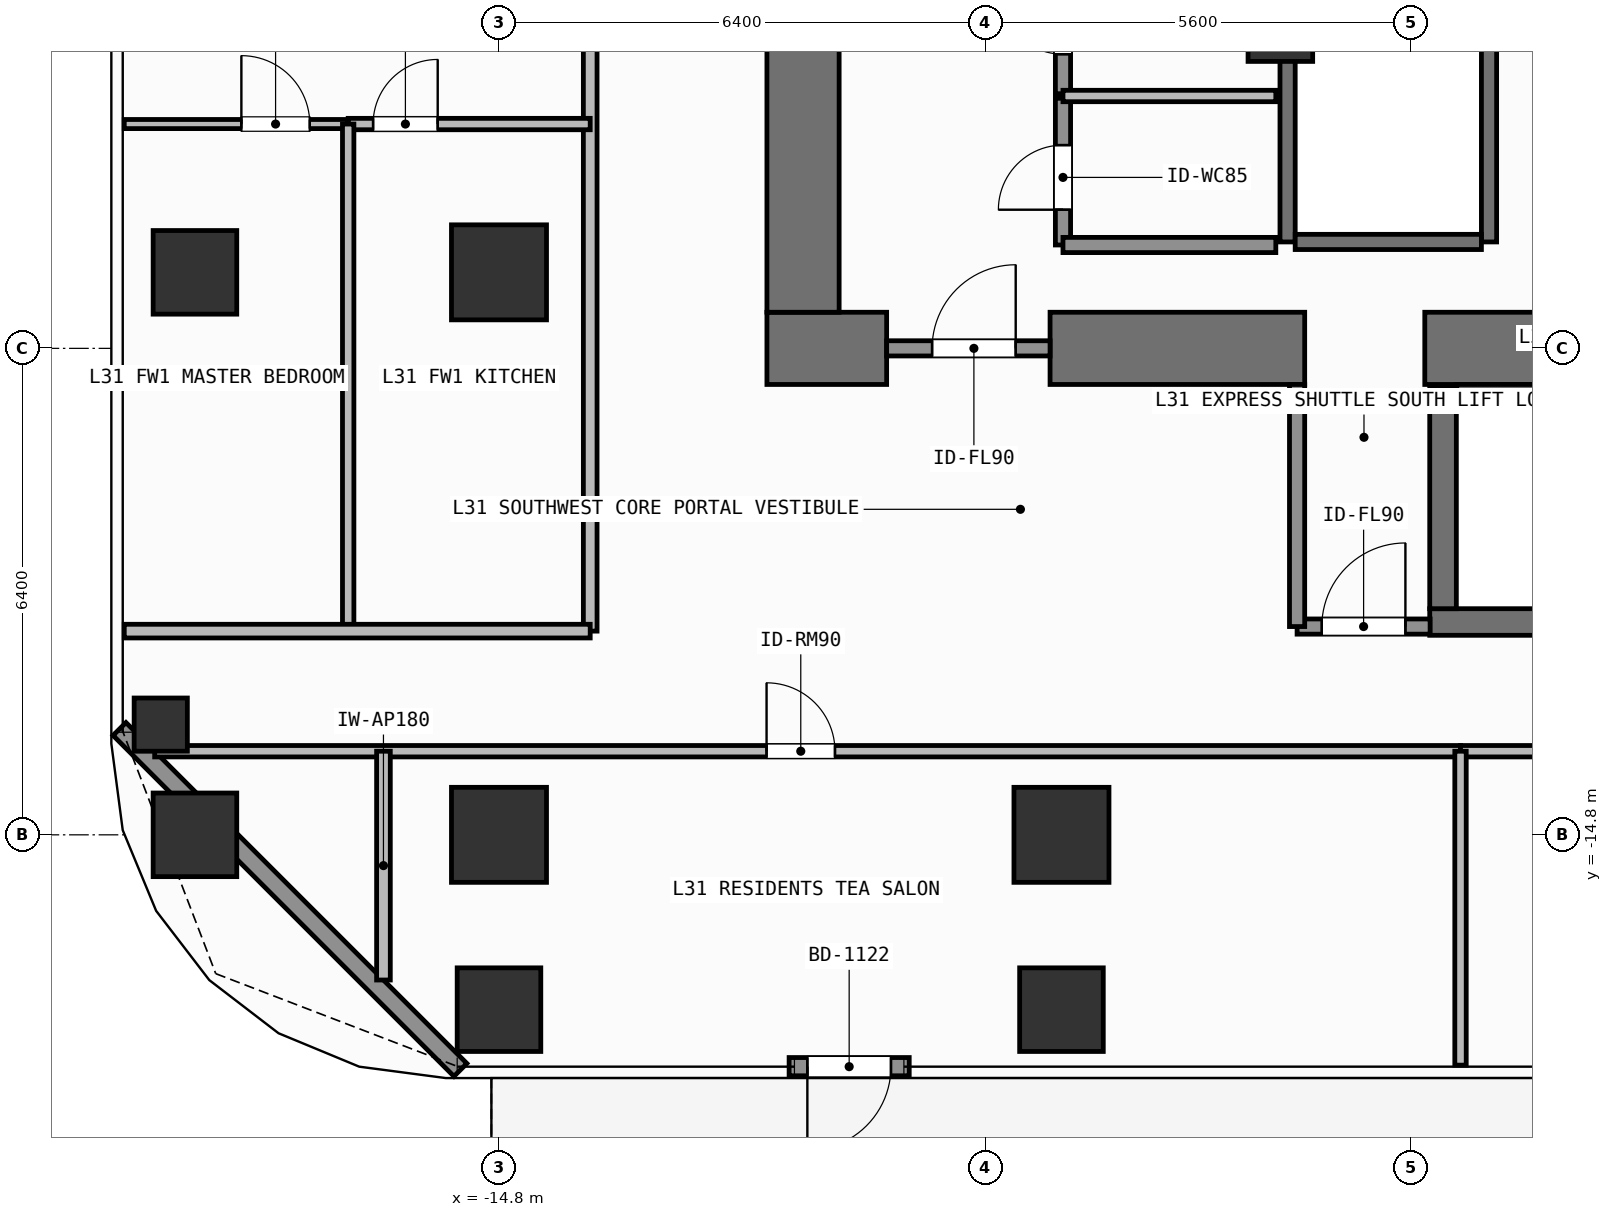
"""IFC4 building model, lengths in metres.
Left out: names, types, materials, properties, quantities, classifications, styles, units other than length and angle.
Written with IfcOpenShell. Run it as: python <this file> out.ifc"""

import sys

from ifc_helpers import new_model, si_unit, direction, frame, frame_2d, origin, origin_2d, place, context, subcontext, project, spatial, rectangle, hollow_rectangle, extrude, element, fill, save


model = new_model("IFC4")
c1 = context("Model", 3, precision=1e-05, world=origin(), true_north=direction((0.0, 1.0)))
c2 = subcontext(c1, "Body", "Model", "MODEL_VIEW")
j1 = project(units=[si_unit("LENGTHUNIT", "METRE"), si_unit("PLANEANGLEUNIT", "RADIAN")], contexts=[c1])
p1 = place(None, origin())
s1 = spatial("IfcSite", under=j1, at=p1, CompositionType="ELEMENT")
p2 = place(p1, origin())
s2 = spatial("IfcBuilding", under=s1, at=p2, CompositionType="ELEMENT")
p3 = place(p2, frame((0.0, 0.0, 125.1)))
s3 = spatial("IfcBuildingStorey", under=s2, at=p3, CompositionType="ELEMENT", Elevation=125.1)
p4 = place(p3, frame((-11.275, -8.4, 0.0), z_axis=(0.0, 0.0, 1.0), x_axis=(1.0, 0.0, 0.0)))
e1 = element("IfcWall", 1, at=p4, inside=s3, PredefinedType="SHEAR", context=c2, shape_type="SweptSolid", body=[
    extrude(rectangle(XDim=1.575, YDim=0.95, at=frame_2d((0.788, 0.0))), origin(), (0.0, 0.0, 1.0), 3.9),
])
p5 = place(p3, frame((-7.55, -8.4, 0.0), z_axis=(0.0, 0.0, 1.0), x_axis=(1.0, 0.0, 0.0)))
e2 = element("IfcWall", 2, at=p5, inside=s3, PredefinedType="SHEAR", context=c2, shape_type="SweptSolid", body=[
    extrude(rectangle(XDim=3.35, YDim=0.95, at=frame_2d((1.675, 0.0))), origin(), (0.0, 0.0, 1.0), 3.9),
])
p6 = place(p3, frame((-2.62, -8.4, 0.0), z_axis=(0.0, 0.0, 1.0), x_axis=(1.0, 0.0, 0.0)))
e3 = element("IfcWall", 3, at=p6, inside=s3, PredefinedType="SHEAR", context=c2, shape_type="SweptSolid", body=[
    extrude(rectangle(XDim=7.27, YDim=0.95, at=frame_2d((3.635, 0.0))), origin(), (0.0, 0.0, 1.0), 3.9),
])
p7 = place(p3, frame((-10.8, -7.925, 0.0), z_axis=(0.0, 0.0, 1.0), x_axis=(0.0, 1.0, 0.0)))
e4 = element("IfcWall", 4, at=p7, inside=s3, PredefinedType="SHEAR", context=c2, shape_type="SweptSolid", body=[
    extrude(rectangle(XDim=15.85, YDim=0.95, at=frame_2d((7.925, 0.0))), origin(), (0.0, 0.0, 1.0), 3.9),
])
p8 = place(p3, frame((-2.555, -12.0, 0.0), z_axis=(0.0, 0.0, 1.0), x_axis=(1.0, 0.0, 0.0)))
e5 = element("IfcWall", 5, at=p8, inside=s3, PredefinedType="SHEAR", context=c2, shape_type="SweptSolid", body=[
    extrude(rectangle(XDim=7.31, YDim=0.35, at=frame_2d((3.655, 0.0))), origin(), (0.0, 0.0, 1.0), 3.9),
])
p9 = place(p3, frame((-2.2, -8.95, 0.0), z_axis=(0.0, 0.0, 1.0), x_axis=(1.0, 0.0, 0.0)))
e6 = element("IfcWall", 6, at=p9, inside=s3, PredefinedType="SHEAR", context=c2, shape_type="SweptSolid", body=[
    extrude(rectangle(XDim=6.6, YDim=0.15, at=frame_2d((3.3, 0.0))), origin(), (0.0, 0.0, 1.0), 3.9),
])
p10 = place(p3, frame((-2.38, -11.825, 0.0), z_axis=(0.0, 0.0, 1.0), x_axis=(0.0, 1.0, 0.0)))
e7 = element("IfcWall", 7, at=p10, inside=s3, PredefinedType="SHEAR", context=c2, shape_type="SweptSolid", body=[
    extrude(rectangle(XDim=2.925, YDim=0.35, at=frame_2d((1.462, 0.0))), origin(), (0.0, 0.0, 1.0), 3.9),
])
for number, where, z_axis, x_axis in (
    (8, (-14.8, -14.8, 0.0), (0.0, 0.0, 1.0), (1.0, 0.0, 0.0)),
    (9, (-7.4, -14.8, 0.0), (0.0, 0.0, 1.0), (1.0, 0.0, 0.0)),
    (10, (-14.8, -7.4, 0.0), (0.0, 0.0, 1.0), (1.0, 0.0, 0.0)),
):
    element("IfcColumn", number, at=place(p3, frame(where, z_axis=z_axis, x_axis=x_axis)), inside=s3, PredefinedType="COLUMN", context=c2, shape_type="SweptSolid", body=[
        extrude(rectangle(XDim=1.25, YDim=1.25, at=origin_2d()), origin(), (0.0, 0.0, 1.0), 3.9),
    ])
p11 = place(p3, frame((-4.52, -4.2, 0.0), z_axis=(0.0, 0.0, 1.0), x_axis=(1.0, 0.0, 0.0)))
e11 = element("IfcColumn", 11, at=p11, inside=s3, PredefinedType="COLUMN", context=c2, shape_type="SweptSolid", body=[
    extrude(rectangle(XDim=0.85, YDim=0.85, at=origin_2d()), origin(), (0.0, 0.0, 1.0), 3.9),
])
for number, where, z_axis, x_axis in (
    (12, (-18.8, -14.8, 0.0), (0.0, 0.0, 1.0), (1.0, 0.0, 0.0)),
    (13, (-18.8, -7.4, 0.0), (0.0, 0.0, 1.0), (1.0, 0.0, 0.0)),
    (14, (-14.8, -17.1, 0.0), (0.0, 0.0, 1.0), (1.0, 0.0, 0.0)),
    (15, (-7.4, -17.1, 0.0), (0.0, 0.0, 1.0), (1.0, 0.0, 0.0)),
):
    element("IfcColumn", number, at=place(p3, frame(where, z_axis=z_axis, x_axis=x_axis)), inside=s3, PredefinedType="COLUMN", context=c2, shape_type="SweptSolid", body=[
        extrude(rectangle(XDim=1.1, YDim=1.1, at=origin_2d()), origin(), (0.0, 0.0, 1.0), 3.9),
    ])
p12 = place(p3, frame((-19.25, -13.35, 0.0), z_axis=(0.0, 0.0, 1.0), x_axis=(1.0, 0.0, 0.0)))
e16 = element("IfcColumn", 16, at=p12, inside=s3, PredefinedType="COLUMN", context=c2, shape_type="SweptSolid", body=[
    extrude(hollow_rectangle(XDim=0.7, YDim=0.7, WallThickness=0.032, at=origin_2d()), origin(), (0.0, 0.0, 1.0), 3.9),
])
p13 = place(p3, frame((-9.403, -17.85, 0.0), z_axis=(0.0, 0.0, 1.0), x_axis=(-1.0, 0.0, 0.0)))
e17 = element("IfcWall", 17, at=p13, inside=s3, PredefinedType="SOLIDWALL", context=c2, shape_type="SweptSolid", body=[
    extrude(rectangle(XDim=1.58, YDim=0.24, at=frame_2d((0.79, 0.0))), origin(), (0.0, 0.0, 1.0), 3.68),
])
p14 = place(p13, frame((0.24, 0.0, 0.0)))
e18 = element("IfcOpeningElement", 18, at=p14, cuts=e17, PredefinedType="OPENING", context=c2, shape_type="SweptSolid", body=[
    extrude(rectangle(XDim=1.1, YDim=2.2, at=frame_2d((0.55, 1.1))), frame((0.0, 0.13, 0.0), z_axis=(0.0, -1.0, 0.0), x_axis=(1.0, 0.0, 0.0)), (0.0, 0.0, 1.0), 0.26),
])
p15 = place(p3, frame((-15.308, -17.892, 0.0), z_axis=(0.0, 0.0, 1.0), x_axis=(-0.707126027686, 0.707087534163, 0.0)))
e19 = element("IfcWall", 19, at=p15, inside=s3, PredefinedType="SOLIDWALL", context=c2, shape_type="SweptSolid", body=[
    extrude(rectangle(XDim=6.342, YDim=0.24, at=frame_2d((3.171, 0.0))), origin(), (0.0, 0.0, 1.0), 3.68),
])
for number, where, z_axis, x_axis in (
    (20, (-4.425, -7.0, 0.0), (0.0, 0.0, 1.0), (0.0, 1.0, 0.0)),
    (21, (-1.775, -7.0, 0.0), (0.0, 0.0, 1.0), (0.0, 1.0, 0.0)),
):
    element("IfcWall", number, at=place(p3, frame(where, z_axis=z_axis, x_axis=x_axis)), inside=s3, PredefinedType="SHEAR", context=c2, shape_type="SweptSolid", body=[
        extrude(rectangle(XDim=2.8, YDim=0.2, at=frame_2d((1.4, 0.0))), origin(), (0.0, 0.0, 1.0), 3.68),
    ])
p16 = place(p3, frame((-4.325, -7.0, 0.0), z_axis=(0.0, 0.0, 1.0), x_axis=(1.0, 0.0, 0.0)))
e22 = element("IfcWall", 22, at=p16, inside=s3, PredefinedType="SHEAR", context=c2, shape_type="SweptSolid", body=[
    extrude(rectangle(XDim=2.45, YDim=0.2, at=frame_2d((1.225, 0.0))), origin(), (0.0, 0.0, 1.0), 3.68),
])
p17 = place(p3, frame((-9.7, -8.4, 0.0), z_axis=(0.0, 0.0, 1.0), x_axis=(1.0, 0.0, 0.0)))
e23 = element("IfcWall", 23, at=p17, inside=s3, PredefinedType="SOLIDWALL", context=c2, shape_type="SweptSolid", body=[
    extrude(rectangle(XDim=2.15, YDim=0.2, at=frame_2d((1.075, 0.0))), origin(), (0.0, 0.0, 1.0), 2.72),
])
p18 = place(p17, frame((0.598, 0.0, 0.0)))
e24 = element("IfcOpeningElement", 24, at=p18, cuts=e23, PredefinedType="OPENING", context=c2, shape_type="SweptSolid", body=[
    extrude(rectangle(XDim=1.1, YDim=2.15, at=frame_2d((0.55, 1.075))), frame((0.0, 0.11, 0.0), z_axis=(0.0, -1.0, 0.0), x_axis=(1.0, 0.0, 0.0)), (0.0, 0.0, 1.0), 0.22),
])
p19 = place(p3, frame((-4.3, -12.06, 0.0), z_axis=(0.0, 0.0, 1.0), x_axis=(1.0, 0.0, 0.0)))
e25 = element("IfcWall", 25, at=p19, inside=s3, PredefinedType="SOLIDWALL", context=c2, shape_type="SweptSolid", body=[
    extrude(rectangle(XDim=1.75, YDim=0.2, at=frame_2d((0.875, 0.0))), origin(), (0.0, 0.0, 1.0), 3.68),
])
p20 = place(p19, frame((0.325, 0.0, 0.0)))
e26 = element("IfcOpeningElement", 26, at=p20, cuts=e25, PredefinedType="OPENING", context=c2, shape_type="SweptSolid", body=[
    extrude(rectangle(XDim=1.1, YDim=2.15, at=frame_2d((0.55, 1.075))), frame((0.0, 0.11, 0.0), z_axis=(0.0, -1.0, 0.0), x_axis=(1.0, 0.0, 0.0)), (0.0, 0.0, 1.0), 0.22),
])
p21 = place(p3, frame((-7.38, -7.04, 0.0), z_axis=(0.0, 0.0, 1.0), x_axis=(0.0, 1.0, 0.0)))
e27 = element("IfcWall", 27, at=p21, inside=s3, PredefinedType="SOLIDWALL", context=c2, shape_type="SweptSolid", body=[
    extrude(rectangle(XDim=1.93, YDim=0.2, at=frame_2d((0.965, 0.0))), origin(), (0.0, 0.0, 1.0), 3.68),
])
p22 = place(p21, frame((0.464, 0.0, 0.0)))
e28 = element("IfcOpeningElement", 28, at=p22, cuts=e27, PredefinedType="OPENING", context=c2, shape_type="SweptSolid", body=[
    extrude(rectangle(XDim=0.85, YDim=2.1, at=frame_2d((0.425, 1.05))), frame((0.0, 0.11, 0.0), z_axis=(0.0, -1.0, 0.0), x_axis=(1.0, 0.0, 0.0)), (0.0, 0.0, 1.0), 0.22),
])
p23 = place(p3, frame((-7.38, -5.05, 0.0), z_axis=(0.0, 0.0, 1.0), x_axis=(0.0, 1.0, 0.0)))
e29 = element("IfcWall", 29, at=p23, inside=s3, PredefinedType="SOLIDWALL", context=c2, shape_type="SweptSolid", body=[
    extrude(rectangle(XDim=1.89, YDim=0.2, at=frame_2d((0.945, 0.0))), origin(), (0.0, 0.0, 1.0), 3.68),
])
p24 = place(p23, frame((0.52, 0.0, 0.0)))
e30 = element("IfcOpeningElement", 30, at=p24, cuts=e29, PredefinedType="OPENING", context=c2, shape_type="SweptSolid", body=[
    extrude(rectangle(XDim=0.85, YDim=2.1, at=frame_2d((0.425, 1.05))), frame((0.0, 0.11, 0.0), z_axis=(0.0, -1.0, 0.0), x_axis=(1.0, 0.0, 0.0)), (0.0, 0.0, 1.0), 0.22),
])
p25 = place(p3, frame((-19.33, -13.7, 0.0), z_axis=(0.0, 0.0, 1.0), x_axis=(1.0, 0.0, 0.0)))
e31 = element("IfcWall", 31, at=p25, inside=s3, PredefinedType="PARTITIONING", context=c2, shape_type="SweptSolid", body=[
    extrude(rectangle(XDim=17.18, YDim=0.15, at=frame_2d((8.59, 0.0))), origin(), (0.0, 0.0, 1.0), 3.68),
])
p26 = place(p25, frame((8.05, 0.0, 0.0)))
e32 = element("IfcOpeningElement", 32, at=p26, cuts=e31, PredefinedType="OPENING", context=c2, shape_type="SweptSolid", body=[
    extrude(rectangle(XDim=0.9, YDim=2.1, at=frame_2d((0.45, 1.05))), frame((0.0, 0.085, 0.0), z_axis=(0.0, -1.0, 0.0), x_axis=(1.0, 0.0, 0.0)), (0.0, 0.0, 1.0), 0.17),
])
p27 = place(p3, frame((-2.15, -13.7, 0.0), z_axis=(0.0, 0.0, 1.0), x_axis=(1.0, 0.0, 0.0)))
e33 = element("IfcWall", 33, at=p27, inside=s3, PredefinedType="PARTITIONING", context=c2, shape_type="SweptSolid", body=[
    extrude(rectangle(XDim=13.031, YDim=0.15, at=frame_2d((6.516, 0.0))), origin(), (0.0, 0.0, 1.0), 3.68),
])
p28 = place(p27, frame((6.065, 0.0, 0.0)))
e34 = element("IfcOpeningElement", 34, at=p28, cuts=e33, PredefinedType="OPENING", context=c2, shape_type="SweptSolid", body=[
    extrude(rectangle(XDim=0.9, YDim=2.1, at=frame_2d((0.45, 1.05))), frame((0.0, 0.085, 0.0), z_axis=(0.0, -1.0, 0.0), x_axis=(1.0, 0.0, 0.0)), (0.0, 0.0, 1.0), 0.17),
])
p29 = place(p3, frame((-13.6, -12.12, 0.0), z_axis=(0.0, 0.0, 1.0), x_axis=(0.0, 1.0, 0.0)))
e35 = element("IfcWall", 35, at=p29, inside=s3, PredefinedType="PARTITIONING", context=c2, shape_type="SweptSolid", body=[
    extrude(rectangle(XDim=24.24, YDim=0.18, at=frame_2d((12.12, 0.0))), origin(), (0.0, 0.0, 1.0), 3.68),
])
p30 = place(p29, frame((11.62, 0.0, 0.0)))
e36 = element("IfcOpeningElement", 36, at=p30, cuts=e35, PredefinedType="OPENING", context=c2, shape_type="SweptSolid", body=[
    extrude(rectangle(XDim=1.0, YDim=2.2, at=frame_2d((0.5, 1.1))), frame((0.0, 0.1, 0.0), z_axis=(0.0, -1.0, 0.0), x_axis=(1.0, 0.0, 0.0)), (0.0, 0.0, 1.0), 0.2),
])
p31 = place(p3, frame((-16.784, -5.449, 0.0), z_axis=(0.0, 0.0, 1.0), x_axis=(1.0, 0.0, 0.0)))
e37 = element("IfcWall", 37, at=p31, inside=s3, PredefinedType="PARTITIONING", context=c2, shape_type="SweptSolid", body=[
    extrude(rectangle(XDim=3.184, YDim=0.15, at=frame_2d((1.592, 0.0))), origin(), (0.0, 0.0, 1.0), 3.68),
])
p32 = place(p31, frame((0.328, 0.0, 0.0)))
e38 = element("IfcOpeningElement", 38, at=p32, cuts=e37, PredefinedType="OPENING", context=c2, shape_type="SweptSolid", body=[
    extrude(rectangle(XDim=0.85, YDim=2.1, at=frame_2d((0.425, 1.05))), frame((0.0, 0.085, 0.0), z_axis=(0.0, -1.0, 0.0), x_axis=(1.0, 0.0, 0.0)), (0.0, 0.0, 1.0), 0.17),
])
p33 = place(p3, frame((-19.73, -5.449, 0.0), z_axis=(0.0, 0.0, 1.0), x_axis=(1.0, 0.0, 0.0)))
e39 = element("IfcWall", 39, at=p33, inside=s3, PredefinedType="PARTITIONING", context=c2, shape_type="SweptSolid", body=[
    extrude(rectangle(XDim=2.946, YDim=0.12, at=frame_2d((1.473, 0.0))), origin(), (0.0, 0.0, 1.0), 3.68),
])
p34 = place(p33, frame((1.541, 0.0, 0.0)))
e40 = element("IfcOpeningElement", 40, at=p34, cuts=e39, PredefinedType="OPENING", context=c2, shape_type="SweptSolid", body=[
    extrude(rectangle(XDim=0.9, YDim=2.1, at=frame_2d((0.45, 1.05))), frame((0.0, 0.07, 0.0), z_axis=(0.0, -1.0, 0.0), x_axis=(1.0, 0.0, 0.0)), (0.0, 0.0, 1.0), 0.14),
])
p35 = place(p3, frame((-4.3, -12.06, 0.0), z_axis=(0.0, 0.0, 1.0), x_axis=(0.0, 1.0, 0.0)))
e41 = element("IfcWall", 41, at=p35, inside=s3, PredefinedType="SOLIDWALL", context=c2, shape_type="SweptSolid", body=[
    extrude(rectangle(XDim=3.185, YDim=0.2, at=frame_2d((1.593, 0.0))), origin(), (0.0, 0.0, 1.0), 3.68),
])
p36 = place(p3, frame((-7.38, -7.04, 0.0), z_axis=(0.0, 0.0, 1.0), x_axis=(1.0, 0.0, 0.0)))
e42 = element("IfcWall", 42, at=p36, inside=s3, PredefinedType="SOLIDWALL", context=c2, shape_type="SweptSolid", body=[
    extrude(rectangle(XDim=2.8, YDim=0.2, at=frame_2d((1.4, 0.0))), origin(), (0.0, 0.0, 1.0), 3.68),
])
p37 = place(p3, frame((-7.38, -5.08, 0.0), z_axis=(0.0, 0.0, 1.0), x_axis=(1.0, 0.0, 0.0)))
e43 = element("IfcWall", 43, at=p37, inside=s3, PredefinedType="PARTITIONING", context=c2, shape_type="SweptSolid", body=[
    extrude(rectangle(XDim=2.8, YDim=0.15, at=frame_2d((1.4, 0.0))), origin(), (0.0, 0.0, 1.0), 3.68),
])
p38 = place(p3, frame((-16.32, -16.71, 0.0), z_axis=(0.0, 0.0, 1.0), x_axis=(0.0, 1.0, 0.0)))
e44 = element("IfcWall", 44, at=p38, inside=s3, PredefinedType="PARTITIONING", context=c2, shape_type="SweptSolid", body=[
    extrude(rectangle(XDim=3.01, YDim=0.18, at=frame_2d((1.505, 0.0))), origin(), (0.0, 0.0, 1.0), 3.68),
])
p39 = place(p3, frame((-2.15, -17.83, 0.0), z_axis=(0.0, 0.0, 1.0), x_axis=(0.0, 1.0, 0.0)))
e45 = element("IfcWall", 45, at=p39, inside=s3, PredefinedType="PARTITIONING", context=c2, shape_type="SweptSolid", body=[
    extrude(rectangle(XDim=4.13, YDim=0.15, at=frame_2d((2.065, 0.0))), origin(), (0.0, 0.0, 1.0), 3.68),
])
p40 = place(p3, frame((-16.784, -12.12, 0.0), z_axis=(0.0, 0.0, 1.0), x_axis=(0.0, 1.0, 0.0)))
e46 = element("IfcWall", 46, at=p40, inside=s3, PredefinedType="PARTITIONING", context=c2, shape_type="SweptSolid", body=[
    extrude(rectangle(XDim=6.671, YDim=0.15, at=frame_2d((3.335, 0.0))), origin(), (0.0, 0.0, 1.0), 3.68),
])
p41 = place(p3, frame((-19.73, -12.12, 0.0), z_axis=(0.0, 0.0, 1.0), x_axis=(1.0, 0.0, 0.0)))
e47 = element("IfcWall", 47, at=p41, inside=s3, PredefinedType="PARTITIONING", context=c2, shape_type="SweptSolid", body=[
    extrude(rectangle(XDim=6.13, YDim=0.18, at=frame_2d((3.065, 0.0))), origin(), (0.0, 0.0, 1.0), 3.68),
])
p42 = place(p14, origin())
e48 = element("IfcDoor", 48, at=p42, inside=s3, OperationType="SINGLE_SWING_RIGHT", PredefinedType="DOOR", context=c2, shape_type="SweptSolid", body=[
    extrude(rectangle(XDim=1.1, YDim=2.2, at=frame_2d((0.55, 1.1))), frame((0.0, 0.025, 0.0), z_axis=(0.0, -1.0, 0.0), x_axis=(1.0, 0.0, 0.0)), (0.0, 0.0, 1.0), 0.05),
])
fill(e18, e48)
p43 = place(p18, origin())
e49 = element("IfcDoor", 49, at=p43, inside=s3, OperationType="SINGLE_SWING_RIGHT", PredefinedType="DOOR", context=c2, shape_type="SweptSolid", body=[
    extrude(rectangle(XDim=1.1, YDim=2.15, at=frame_2d((0.55, 1.075))), frame((0.0, 0.025, 0.0), z_axis=(0.0, -1.0, 0.0), x_axis=(1.0, 0.0, 0.0)), (0.0, 0.0, 1.0), 0.05),
])
fill(e24, e49)
p44 = place(p20, origin())
e50 = element("IfcDoor", 50, at=p44, inside=s3, OperationType="SINGLE_SWING_RIGHT", PredefinedType="DOOR", context=c2, shape_type="SweptSolid", body=[
    extrude(rectangle(XDim=1.1, YDim=2.15, at=frame_2d((0.55, 1.075))), frame((0.0, 0.025, 0.0), z_axis=(0.0, -1.0, 0.0), x_axis=(1.0, 0.0, 0.0)), (0.0, 0.0, 1.0), 0.05),
])
fill(e26, e50)
p45 = place(p22, origin())
e51 = element("IfcDoor", 51, at=p45, inside=s3, OperationType="SINGLE_SWING_LEFT", PredefinedType="DOOR", context=c2, shape_type="SweptSolid", body=[
    extrude(rectangle(XDim=0.85, YDim=2.1, at=frame_2d((0.425, 1.05))), frame((0.0, 0.025, 0.0), z_axis=(0.0, -1.0, 0.0), x_axis=(1.0, 0.0, 0.0)), (0.0, 0.0, 1.0), 0.05),
])
fill(e28, e51)
p46 = place(p24, origin())
e52 = element("IfcDoor", 52, at=p46, inside=s3, OperationType="SINGLE_SWING_RIGHT", PredefinedType="DOOR", context=c2, shape_type="SweptSolid", body=[
    extrude(rectangle(XDim=0.85, YDim=2.1, at=frame_2d((0.425, 1.05))), frame((0.0, 0.025, 0.0), z_axis=(0.0, -1.0, 0.0), x_axis=(1.0, 0.0, 0.0)), (0.0, 0.0, 1.0), 0.05),
])
fill(e30, e52)
p47 = place(p26, origin())
e53 = element("IfcDoor", 53, at=p47, inside=s3, OperationType="SINGLE_SWING_LEFT", PredefinedType="DOOR", context=c2, shape_type="SweptSolid", body=[
    extrude(rectangle(XDim=0.9, YDim=2.1, at=frame_2d((0.45, 1.05))), frame((0.0, 0.025, 0.0), z_axis=(0.0, -1.0, 0.0), x_axis=(1.0, 0.0, 0.0)), (0.0, 0.0, 1.0), 0.05),
])
fill(e32, e53)
p48 = place(p32, origin())
e54 = element("IfcDoor", 54, at=p48, inside=s3, OperationType="SINGLE_SWING_RIGHT", PredefinedType="DOOR", context=c2, shape_type="SweptSolid", body=[
    extrude(rectangle(XDim=0.85, YDim=2.1, at=frame_2d((0.425, 1.05))), frame((0.0, 0.025, 0.0), z_axis=(0.0, -1.0, 0.0), x_axis=(1.0, 0.0, 0.0)), (0.0, 0.0, 1.0), 0.05),
])
fill(e38, e54)
p49 = place(p34, origin())
e55 = element("IfcDoor", 55, at=p49, inside=s3, OperationType="SINGLE_SWING_LEFT", PredefinedType="DOOR", context=c2, shape_type="SweptSolid", body=[
    extrude(rectangle(XDim=0.9, YDim=2.1, at=frame_2d((0.45, 1.05))), frame((0.0, 0.025, 0.0), z_axis=(0.0, -1.0, 0.0), x_axis=(1.0, 0.0, 0.0)), (0.0, 0.0, 1.0), 0.05),
])
fill(e40, e55)
save(model, sys.argv[1])
